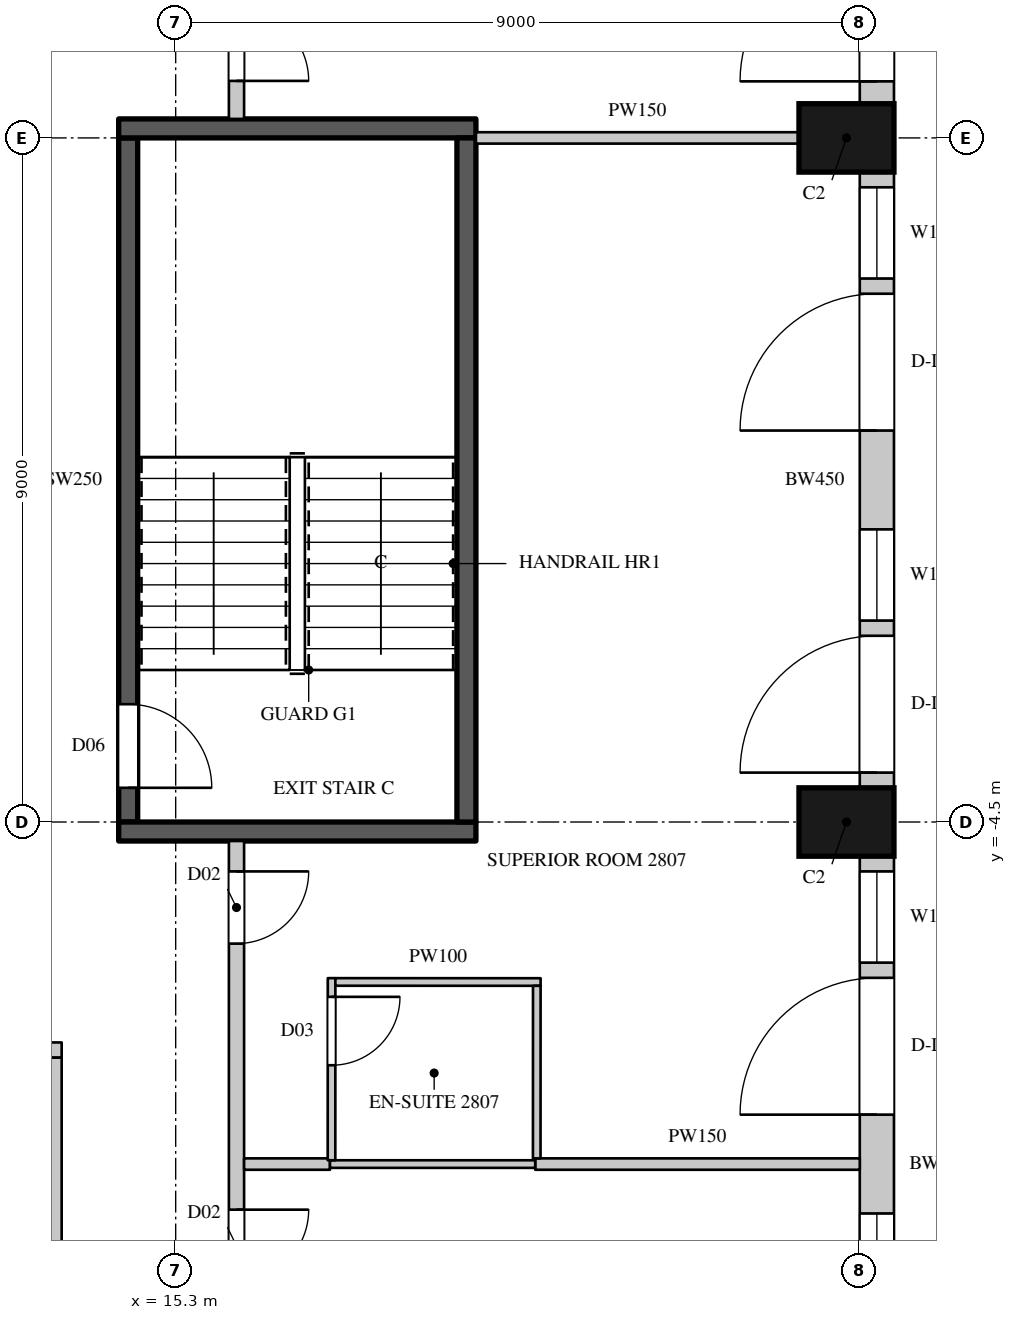
"""IFC4 building model, lengths in metres.
Left out: names, types, materials, properties, quantities, classifications, styles, units other than length and angle.
Written with IfcOpenShell. Run it as: python <this file> out.ifc"""

import sys

from ifc_helpers import new_model, si_unit, direction, frame, frame_2d, origin, origin_2d, place, context, subcontext, project, spatial, rectangle, extrude, element, fill, save


model = new_model("IFC4")
c1 = context("Model", 3, precision=1e-05, world=origin(), true_north=direction((0.0, 1.0)))
c2 = subcontext(c1, "Body", "Model", "MODEL_VIEW")
j1 = project(units=[si_unit("LENGTHUNIT", "METRE"), si_unit("PLANEANGLEUNIT", "RADIAN")], contexts=[c1])
p1 = place(None, origin())
s1 = spatial("IfcSite", under=j1, at=p1, CompositionType="ELEMENT")
p2 = place(p1, origin())
s2 = spatial("IfcBuilding", under=s1, at=p2, CompositionType="ELEMENT")
p3 = place(p2, frame((0.0, 0.0, 131.1)))
s3 = spatial("IfcBuildingStorey", under=s2, at=p3, CompositionType="ELEMENT", Elevation=131.1)
for number, where, z_axis, x_axis in (
    (1, (24.125, -4.5, 0.0), (0.0, 0.0, 1.0), (0.0, 1.0, 0.0)),
    (2, (24.125, 4.5, 0.0), (0.0, 0.0, 1.0), (0.0, 1.0, 0.0)),
):
    element("IfcColumn", number, at=place(p3, frame(where, z_axis=z_axis, x_axis=x_axis)), inside=s3, PredefinedType="COLUMN", context=c2, shape_type="SweptSolid", body=[
        extrude(rectangle(XDim=0.9, YDim=1.25, at=origin_2d()), origin(), (0.0, 0.0, 1.0), 3.6),
    ])
p4 = place(p3, frame((24.525, -13.05, 0.0), z_axis=(0.0, 0.0, 1.0), x_axis=(0.0, 1.0, 0.0)))
e3 = element("IfcWall", 3, at=p4, inside=s3, PredefinedType="SOLIDWALL", context=c2, shape_type="SweptSolid", body=[
    extrude(rectangle(XDim=8.1, YDim=0.45, at=frame_2d((4.05, 0.0))), origin(), (0.0, 0.0, 1.0), 3.3),
])
p5 = place(p4, frame((0.2, 0.0, 0.0)))
e4 = element("IfcOpeningElement", 4, at=p5, cuts=e3, PredefinedType="OPENING", context=c2, shape_type="SweptSolid", body=[
    extrude(rectangle(XDim=1.8, YDim=2.4, at=frame_2d((0.9, 1.2))), frame((0.0, 0.235, 0.0), z_axis=(0.0, -1.0, 0.0), x_axis=(1.0, 0.0, 0.0)), (0.0, 0.0, 1.0), 0.47),
])
p6 = place(p4, frame((2.2, 0.0, 1.05)))
e5 = element("IfcOpeningElement", 5, at=p6, cuts=e3, PredefinedType="OPENING", context=c2, shape_type="SweptSolid", body=[
    extrude(rectangle(XDim=1.2, YDim=2.0, at=frame_2d((0.6, 1.0))), frame((0.0, 0.235, 0.0), z_axis=(0.0, -1.0, 0.0), x_axis=(1.0, 0.0, 0.0)), (0.0, 0.0, 1.0), 0.47),
])
p7 = place(p4, frame((4.7, 0.0, 0.0)))
e6 = element("IfcOpeningElement", 6, at=p7, cuts=e3, PredefinedType="OPENING", context=c2, shape_type="SweptSolid", body=[
    extrude(rectangle(XDim=1.8, YDim=2.4, at=frame_2d((0.9, 1.2))), frame((0.0, 0.235, 0.0), z_axis=(0.0, -1.0, 0.0), x_axis=(1.0, 0.0, 0.0)), (0.0, 0.0, 1.0), 0.47),
])
p8 = place(p4, frame((6.7, 0.0, 1.05)))
e7 = element("IfcOpeningElement", 7, at=p8, cuts=e3, PredefinedType="OPENING", context=c2, shape_type="SweptSolid", body=[
    extrude(rectangle(XDim=1.2, YDim=2.0, at=frame_2d((0.6, 1.0))), frame((0.0, 0.235, 0.0), z_axis=(0.0, -1.0, 0.0), x_axis=(1.0, 0.0, 0.0)), (0.0, 0.0, 1.0), 0.47),
])
p9 = place(p3, frame((24.525, -4.05, 0.0), z_axis=(0.0, 0.0, 1.0), x_axis=(0.0, 1.0, 0.0)))
e8 = element("IfcWall", 8, at=p9, inside=s3, PredefinedType="SOLIDWALL", context=c2, shape_type="SweptSolid", body=[
    extrude(rectangle(XDim=8.1, YDim=0.45, at=frame_2d((4.05, 0.0))), origin(), (0.0, 0.0, 1.0), 3.3),
])
p10 = place(p9, frame((0.2, 0.0, 0.0)))
e9 = element("IfcOpeningElement", 9, at=p10, cuts=e8, PredefinedType="OPENING", context=c2, shape_type="SweptSolid", body=[
    extrude(rectangle(XDim=1.8, YDim=2.4, at=frame_2d((0.9, 1.2))), frame((0.0, 0.235, 0.0), z_axis=(0.0, -1.0, 0.0), x_axis=(1.0, 0.0, 0.0)), (0.0, 0.0, 1.0), 0.47),
])
p11 = place(p9, frame((2.2, 0.0, 1.05)))
e10 = element("IfcOpeningElement", 10, at=p11, cuts=e8, PredefinedType="OPENING", context=c2, shape_type="SweptSolid", body=[
    extrude(rectangle(XDim=1.2, YDim=2.0, at=frame_2d((0.6, 1.0))), frame((0.0, 0.235, 0.0), z_axis=(0.0, -1.0, 0.0), x_axis=(1.0, 0.0, 0.0)), (0.0, 0.0, 1.0), 0.47),
])
p12 = place(p9, frame((4.7, 0.0, 0.0)))
e11 = element("IfcOpeningElement", 11, at=p12, cuts=e8, PredefinedType="OPENING", context=c2, shape_type="SweptSolid", body=[
    extrude(rectangle(XDim=1.8, YDim=2.4, at=frame_2d((0.9, 1.2))), frame((0.0, 0.235, 0.0), z_axis=(0.0, -1.0, 0.0), x_axis=(1.0, 0.0, 0.0)), (0.0, 0.0, 1.0), 0.47),
])
p13 = place(p9, frame((6.7, 0.0, 1.05)))
e12 = element("IfcOpeningElement", 12, at=p13, cuts=e8, PredefinedType="OPENING", context=c2, shape_type="SweptSolid", body=[
    extrude(rectangle(XDim=1.2, YDim=2.0, at=frame_2d((0.6, 1.0))), frame((0.0, 0.235, 0.0), z_axis=(0.0, -1.0, 0.0), x_axis=(1.0, 0.0, 0.0)), (0.0, 0.0, 1.0), 0.47),
])
p14 = place(p3, frame((24.525, 4.95, 0.0), z_axis=(0.0, 0.0, 1.0), x_axis=(0.0, 1.0, 0.0)))
e13 = element("IfcWall", 13, at=p14, inside=s3, PredefinedType="SOLIDWALL", context=c2, shape_type="SweptSolid", body=[
    extrude(rectangle(XDim=8.439, YDim=0.45, at=frame_2d((4.219, 0.0))), origin(), (0.0, 0.0, 1.0), 3.3),
])
p15 = place(p14, frame((0.294, 0.0, 0.0)))
e14 = element("IfcOpeningElement", 14, at=p15, cuts=e13, PredefinedType="OPENING", context=c2, shape_type="SweptSolid", body=[
    extrude(rectangle(XDim=1.8, YDim=2.4, at=frame_2d((0.9, 1.2))), frame((0.0, 0.235, 0.0), z_axis=(0.0, -1.0, 0.0), x_axis=(1.0, 0.0, 0.0)), (0.0, 0.0, 1.0), 0.47),
])
p16 = place(p14, frame((2.294, 0.0, 1.05)))
e15 = element("IfcOpeningElement", 15, at=p16, cuts=e13, PredefinedType="OPENING", context=c2, shape_type="SweptSolid", body=[
    extrude(rectangle(XDim=1.2, YDim=2.0, at=frame_2d((0.6, 1.0))), frame((0.0, 0.235, 0.0), z_axis=(0.0, -1.0, 0.0), x_axis=(1.0, 0.0, 0.0)), (0.0, 0.0, 1.0), 0.47),
])
p17 = place(p14, frame((5.232, 0.0, 1.05)))
e16 = element("IfcOpeningElement", 16, at=p17, cuts=e13, PredefinedType="OPENING", context=c2, shape_type="SweptSolid", body=[
    extrude(rectangle(XDim=2.7, YDim=2.0, at=frame_2d((1.35, 1.0))), frame((0.0, 0.235, 0.0), z_axis=(0.0, -1.0, 0.0), x_axis=(1.0, 0.0, 0.0)), (0.0, 0.0, 1.0), 0.47),
])
p18 = place(p3, frame((10.5, -7.5, 0.0), z_axis=(0.0, 0.0, 1.0), x_axis=(1.0, 0.0, 0.0)))
e17 = element("IfcWall", 17, at=p18, inside=s3, PredefinedType="PARTITIONING", context=c2, shape_type="SweptSolid", body=[
    extrude(rectangle(XDim=3.3, YDim=0.2, at=frame_2d((1.65, 0.0))), origin(), (0.0, 0.0, 1.0), 3.3),
])
p19 = place(p18, frame((2.05, 0.0, 0.0)))
e18 = element("IfcOpeningElement", 18, at=p19, cuts=e17, PredefinedType="OPENING", context=c2, shape_type="SweptSolid", body=[
    extrude(rectangle(XDim=0.9, YDim=2.2, at=frame_2d((0.45, 1.1))), frame((0.0, 0.11, 0.0), z_axis=(0.0, -1.0, 0.0), x_axis=(1.0, 0.0, 0.0)), (0.0, 0.0, 1.0), 0.22),
])
p20 = place(p3, frame((13.7, -15.0, 0.0), z_axis=(0.0, 0.0, 1.0), x_axis=(0.0, 1.0, 0.0)))
e19 = element("IfcWall", 19, at=p20, inside=s3, PredefinedType="PARTITIONING", context=c2, shape_type="SweptSolid", body=[
    extrude(rectangle(XDim=7.4, YDim=0.2, at=frame_2d((3.7, 0.0))), origin(), (0.0, 0.0, 1.0), 3.3),
])
p21 = place(p3, frame((16.1, -17.5, 0.0), z_axis=(0.0, 0.0, 1.0), x_axis=(0.0, 1.0, 0.0)))
e20 = element("IfcWall", 20, at=p21, inside=s3, PredefinedType="PARTITIONING", context=c2, shape_type="SweptSolid", body=[
    extrude(rectangle(XDim=12.75, YDim=0.2, at=frame_2d((6.375, 0.0))), origin(), (0.0, 0.0, 1.0), 3.3),
])
p22 = place(p21, frame((2.75, 0.0, 0.0)))
e21 = element("IfcOpeningElement", 21, at=p22, cuts=e20, PredefinedType="OPENING", context=c2, shape_type="SweptSolid", body=[
    extrude(rectangle(XDim=0.95, YDim=2.2, at=frame_2d((0.475, 1.1))), frame((0.0, 0.11, 0.0), z_axis=(0.0, -1.0, 0.0), x_axis=(1.0, 0.0, 0.0)), (0.0, 0.0, 1.0), 0.22),
])
p23 = place(p21, frame((6.95, 0.0, 0.0)))
e22 = element("IfcOpeningElement", 22, at=p23, cuts=e20, PredefinedType="OPENING", context=c2, shape_type="SweptSolid", body=[
    extrude(rectangle(XDim=0.95, YDim=2.2, at=frame_2d((0.475, 1.1))), frame((0.0, 0.11, 0.0), z_axis=(0.0, -1.0, 0.0), x_axis=(1.0, 0.0, 0.0)), (0.0, 0.0, 1.0), 0.22),
])
p24 = place(p21, frame((11.4, 0.0, 0.0)))
e23 = element("IfcOpeningElement", 23, at=p24, cuts=e20, PredefinedType="OPENING", context=c2, shape_type="SweptSolid", body=[
    extrude(rectangle(XDim=0.95, YDim=2.2, at=frame_2d((0.475, 1.1))), frame((0.0, 0.11, 0.0), z_axis=(0.0, -1.0, 0.0), x_axis=(1.0, 0.0, 0.0)), (0.0, 0.0, 1.0), 0.22),
])
p25 = place(p3, frame((16.1, 4.75, 0.0), z_axis=(0.0, 0.0, 1.0), x_axis=(0.0, 1.0, 0.0)))
e24 = element("IfcWall", 24, at=p25, inside=s3, PredefinedType="PARTITIONING", context=c2, shape_type="SweptSolid", body=[
    extrude(rectangle(XDim=12.65, YDim=0.2, at=frame_2d((6.325, 0.0))), origin(), (0.0, 0.0, 1.0), 3.3),
])
p26 = place(p25, frame((0.5, 0.0, 0.0)))
e25 = element("IfcOpeningElement", 25, at=p26, cuts=e24, PredefinedType="OPENING", context=c2, shape_type="SweptSolid", body=[
    extrude(rectangle(XDim=0.95, YDim=2.2, at=frame_2d((0.475, 1.1))), frame((0.0, 0.11, 0.0), z_axis=(0.0, -1.0, 0.0), x_axis=(1.0, 0.0, 0.0)), (0.0, 0.0, 1.0), 0.22),
])
p27 = place(p25, frame((6.9, 0.0, 0.0)))
e26 = element("IfcOpeningElement", 26, at=p27, cuts=e24, PredefinedType="OPENING", context=c2, shape_type="SweptSolid", body=[
    extrude(rectangle(XDim=0.95, YDim=2.2, at=frame_2d((0.475, 1.1))), frame((0.0, 0.11, 0.0), z_axis=(0.0, -1.0, 0.0), x_axis=(1.0, 0.0, 0.0)), (0.0, 0.0, 1.0), 0.22),
])
p28 = place(p3, frame((16.2, -9.0, 0.0), z_axis=(0.0, 0.0, 1.0), x_axis=(1.0, 0.0, 0.0)))
e27 = element("IfcWall", 27, at=p28, inside=s3, PredefinedType="PARTITIONING", context=c2, shape_type="SweptSolid", body=[
    extrude(rectangle(XDim=1.13, YDim=0.15, at=frame_2d((0.565, 0.0))), origin(), (0.0, 0.0, 1.0), 2.65),
])
p29 = place(p3, frame((19.25, 4.5, 0.0), z_axis=(0.0, 0.0, 1.0), x_axis=(1.0, 0.0, 0.0)))
e28 = element("IfcWall", 28, at=p29, inside=s3, PredefinedType="PARTITIONING", context=c2, shape_type="SweptSolid", body=[
    extrude(rectangle(XDim=4.25, YDim=0.15, at=frame_2d((2.125, 0.0))), origin(), (0.0, 0.0, 1.0), 3.3),
])
p30 = place(p3, frame((20.03, -9.0, 0.0), z_axis=(0.0, 0.0, 1.0), x_axis=(1.0, 0.0, 0.0)))
e29 = element("IfcWall", 29, at=p30, inside=s3, PredefinedType="PARTITIONING", context=c2, shape_type="SweptSolid", body=[
    extrude(rectangle(XDim=4.27, YDim=0.15, at=frame_2d((2.135, 0.0))), origin(), (0.0, 0.0, 1.0), 2.65),
])
p31 = place(p3, frame((14.675, -4.5, 0.0), z_axis=(0.0, 0.0, 1.0), x_axis=(0.0, 1.0, 0.0)))
e30 = element("IfcWall", 30, at=p31, inside=s3, PredefinedType="SHEAR", context=c2, shape_type="SweptSolid", body=[
    extrude(rectangle(XDim=9.0, YDim=0.25, at=frame_2d((4.5, 0.0))), origin(), (0.0, 0.0, 1.0), 3.3),
])
p32 = place(p31, frame((0.45, 0.0, 0.0)))
e31 = element("IfcOpeningElement", 31, at=p32, cuts=e30, PredefinedType="OPENING", context=c2, shape_type="SweptSolid", body=[
    extrude(rectangle(XDim=1.1, YDim=2.2, at=frame_2d((0.55, 1.1))), frame((0.0, 0.135, 0.0), z_axis=(0.0, -1.0, 0.0), x_axis=(1.0, 0.0, 0.0)), (0.0, 0.0, 1.0), 0.27),
])
for number, where, z_axis, x_axis in (
    (32, (14.55, -4.625, 0.0), (0.0, 0.0, 1.0), (1.0, 0.0, 0.0)),
    (33, (14.55, 4.625, 0.0), (0.0, 0.0, 1.0), (1.0, 0.0, 0.0)),
):
    element("IfcWall", number, at=place(p3, frame(where, z_axis=z_axis, x_axis=x_axis)), inside=s3, PredefinedType="SHEAR", context=c2, shape_type="SweptSolid", body=[
        extrude(rectangle(XDim=4.7, YDim=0.25, at=frame_2d((2.35, 0.0))), origin(), (0.0, 0.0, 1.0), 3.3),
    ])
p33 = place(p3, frame((19.125, -4.5, 0.0), z_axis=(0.0, 0.0, 1.0), x_axis=(0.0, 1.0, 0.0)))
e34 = element("IfcWall", 34, at=p33, inside=s3, PredefinedType="SHEAR", context=c2, shape_type="SweptSolid", body=[
    extrude(rectangle(XDim=9.0, YDim=0.25, at=frame_2d((4.5, 0.0))), origin(), (0.0, 0.0, 1.0), 3.3),
])
p34 = place(p3, frame((17.33, -9.0, 0.0), z_axis=(0.0, 0.0, 1.0), x_axis=(1.0, 0.0, 0.0)))
e35 = element("IfcWall", 35, at=p34, inside=s3, PredefinedType="PARTITIONING", context=c2, shape_type="SweptSolid", body=[
    extrude(rectangle(XDim=2.7, YDim=0.1, at=frame_2d((1.35, 0.0))), origin(), (0.0, 0.0, 1.0), 2.65),
])
p35 = place(p3, frame((17.35, -8.95, 0.0), z_axis=(0.0, 0.0, 1.0), x_axis=(0.000407580973, 0.999999916939, 0.0)))
e36 = element("IfcWall", 36, at=p35, inside=s3, PredefinedType="PARTITIONING", context=c2, shape_type="SweptSolid", body=[
    extrude(rectangle(XDim=2.396, YDim=0.1, at=frame_2d((1.198, 0.0))), origin(), (0.0, 0.0, 1.0), 3.3),
])
p36 = place(p35, frame((1.25, 0.0, 0.0)))
e37 = element("IfcOpeningElement", 37, at=p36, cuts=e36, PredefinedType="OPENING", context=c2, shape_type="SweptSolid", body=[
    extrude(rectangle(XDim=0.9, YDim=2.2, at=frame_2d((0.45, 1.1))), frame((0.0, 0.06, 0.0), z_axis=(0.0, -1.0, 0.0), x_axis=(1.0, 0.0, 0.0)), (0.0, 0.0, 1.0), 0.12),
])
p37 = place(p3, frame((17.401, -6.604, 0.0), z_axis=(0.0, 0.0, 1.0), x_axis=(0.9999999346, -0.000361663629, 0.0)))
e38 = element("IfcWall", 38, at=p37, inside=s3, PredefinedType="PARTITIONING", context=c2, shape_type="SweptSolid", body=[
    extrude(rectangle(XDim=2.7, YDim=0.1, at=frame_2d((1.35, 0.0))), origin(), (0.0, 0.0, 1.0), 3.3),
])
p38 = place(p3, frame((20.05, -8.925, 0.0), z_axis=(0.0, 0.0, 1.0), x_axis=(0.000430200003, 0.999999907464, 0.0)))
e39 = element("IfcWall", 39, at=p38, inside=s3, PredefinedType="PARTITIONING", context=c2, shape_type="SweptSolid", body=[
    extrude(rectangle(XDim=2.27, YDim=0.1, at=frame_2d((1.135, 0.0))), origin(), (0.0, 0.0, 1.0), 3.3),
])
p39 = place(p6, origin())
e40 = element("IfcWindow", 40, at=p39, inside=s3, PartitioningType="SINGLE_PANEL", PredefinedType="WINDOW", context=c2, shape_type="SweptSolid", body=[
    extrude(rectangle(XDim=1.2, YDim=2.0, at=frame_2d((0.6, 1.0))), frame((0.0, 0.135, 0.0), z_axis=(0.0, -1.0, 0.0), x_axis=(1.0, 0.0, 0.0)), (0.0, 0.0, 1.0), 0.06),
])
fill(e5, e40)
p40 = place(p7, origin())
e41 = element("IfcDoor", 41, at=p40, inside=s3, OperationType="SLIDING_TO_LEFT", PredefinedType="DOOR", context=c2, shape_type="SweptSolid", body=[
    extrude(rectangle(XDim=1.8, YDim=2.4, at=frame_2d((0.9, 1.2))), frame((0.0, 0.13, 0.0), z_axis=(0.0, -1.0, 0.0), x_axis=(1.0, 0.0, 0.0)), (0.0, 0.0, 1.0), 0.05),
])
fill(e6, e41)
p41 = place(p8, origin())
e42 = element("IfcWindow", 42, at=p41, inside=s3, PartitioningType="SINGLE_PANEL", PredefinedType="WINDOW", context=c2, shape_type="SweptSolid", body=[
    extrude(rectangle(XDim=1.2, YDim=2.0, at=frame_2d((0.6, 1.0))), frame((0.0, 0.135, 0.0), z_axis=(0.0, -1.0, 0.0), x_axis=(1.0, 0.0, 0.0)), (0.0, 0.0, 1.0), 0.06),
])
fill(e7, e42)
p42 = place(p10, origin())
e43 = element("IfcDoor", 43, at=p42, inside=s3, OperationType="SLIDING_TO_LEFT", PredefinedType="DOOR", context=c2, shape_type="SweptSolid", body=[
    extrude(rectangle(XDim=1.8, YDim=2.4, at=frame_2d((0.9, 1.2))), frame((0.0, 0.13, 0.0), z_axis=(0.0, -1.0, 0.0), x_axis=(1.0, 0.0, 0.0)), (0.0, 0.0, 1.0), 0.05),
])
fill(e9, e43)
p43 = place(p11, origin())
e44 = element("IfcWindow", 44, at=p43, inside=s3, PartitioningType="SINGLE_PANEL", PredefinedType="WINDOW", context=c2, shape_type="SweptSolid", body=[
    extrude(rectangle(XDim=1.2, YDim=2.0, at=frame_2d((0.6, 1.0))), frame((0.0, 0.135, 0.0), z_axis=(0.0, -1.0, 0.0), x_axis=(1.0, 0.0, 0.0)), (0.0, 0.0, 1.0), 0.06),
])
fill(e10, e44)
p44 = place(p12, origin())
e45 = element("IfcDoor", 45, at=p44, inside=s3, OperationType="SLIDING_TO_LEFT", PredefinedType="DOOR", context=c2, shape_type="SweptSolid", body=[
    extrude(rectangle(XDim=1.8, YDim=2.4, at=frame_2d((0.9, 1.2))), frame((0.0, 0.13, 0.0), z_axis=(0.0, -1.0, 0.0), x_axis=(1.0, 0.0, 0.0)), (0.0, 0.0, 1.0), 0.05),
])
fill(e11, e45)
p45 = place(p13, origin())
e46 = element("IfcWindow", 46, at=p45, inside=s3, PartitioningType="SINGLE_PANEL", PredefinedType="WINDOW", context=c2, shape_type="SweptSolid", body=[
    extrude(rectangle(XDim=1.2, YDim=2.0, at=frame_2d((0.6, 1.0))), frame((0.0, 0.135, 0.0), z_axis=(0.0, -1.0, 0.0), x_axis=(1.0, 0.0, 0.0)), (0.0, 0.0, 1.0), 0.06),
])
fill(e12, e46)
p46 = place(p15, origin())
e47 = element("IfcDoor", 47, at=p46, inside=s3, OperationType="SLIDING_TO_LEFT", PredefinedType="DOOR", context=c2, shape_type="SweptSolid", body=[
    extrude(rectangle(XDim=1.8, YDim=2.4, at=frame_2d((0.9, 1.2))), frame((0.0, 0.13, 0.0), z_axis=(0.0, -1.0, 0.0), x_axis=(1.0, 0.0, 0.0)), (0.0, 0.0, 1.0), 0.05),
])
fill(e14, e47)
p47 = place(p23, origin())
e48 = element("IfcDoor", 48, at=p47, inside=s3, OperationType="SINGLE_SWING_LEFT", PredefinedType="DOOR", context=c2, shape_type="SweptSolid", body=[
    extrude(rectangle(XDim=0.95, YDim=2.2, at=frame_2d((0.475, 1.1))), frame((0.0, 0.025, 0.0), z_axis=(0.0, -1.0, 0.0), x_axis=(1.0, 0.0, 0.0)), (0.0, 0.0, 1.0), 0.05),
])
fill(e22, e48)
p48 = place(p24, origin())
e49 = element("IfcDoor", 49, at=p48, inside=s3, OperationType="SINGLE_SWING_LEFT", PredefinedType="DOOR", context=c2, shape_type="SweptSolid", body=[
    extrude(rectangle(XDim=0.95, YDim=2.2, at=frame_2d((0.475, 1.1))), frame((0.0, 0.025, 0.0), z_axis=(0.0, -1.0, 0.0), x_axis=(1.0, 0.0, 0.0)), (0.0, 0.0, 1.0), 0.05),
])
fill(e23, e49)
p49 = place(p36, origin())
e50 = element("IfcDoor", 50, at=p49, inside=s3, OperationType="SINGLE_SWING_LEFT", PredefinedType="DOOR", context=c2, shape_type="SweptSolid", body=[
    extrude(rectangle(XDim=0.9, YDim=2.2, at=frame_2d((0.45, 1.1))), frame((0.0, 0.025, 0.0), z_axis=(0.0, -1.0, 0.0), x_axis=(1.0, 0.0, 0.0)), (0.0, 0.0, 1.0), 0.05),
])
fill(e37, e50)
p50 = place(p26, origin())
e51 = element("IfcDoor", 51, at=p50, inside=s3, OperationType="SINGLE_SWING_RIGHT", PredefinedType="DOOR", context=c2, shape_type="SweptSolid", body=[
    extrude(rectangle(XDim=0.95, YDim=2.2, at=frame_2d((0.475, 1.1))), frame((0.0, 0.025, 0.0), z_axis=(0.0, -1.0, 0.0), x_axis=(1.0, 0.0, 0.0)), (0.0, 0.0, 1.0), 0.05),
])
fill(e25, e51)
p51 = place(p32, origin())
e52 = element("IfcDoor", 52, at=p51, inside=s3, OperationType="SINGLE_SWING_RIGHT", PredefinedType="DOOR", context=c2, shape_type="SweptSolid", body=[
    extrude(rectangle(XDim=1.1, YDim=2.2, at=frame_2d((0.55, 1.1))), frame((0.0, 0.025, 0.0), z_axis=(0.0, -1.0, 0.0), x_axis=(1.0, 0.0, 0.0)), (0.0, 0.0, 1.0), 0.05),
])
fill(e31, e52)
save(model, sys.argv[1])
